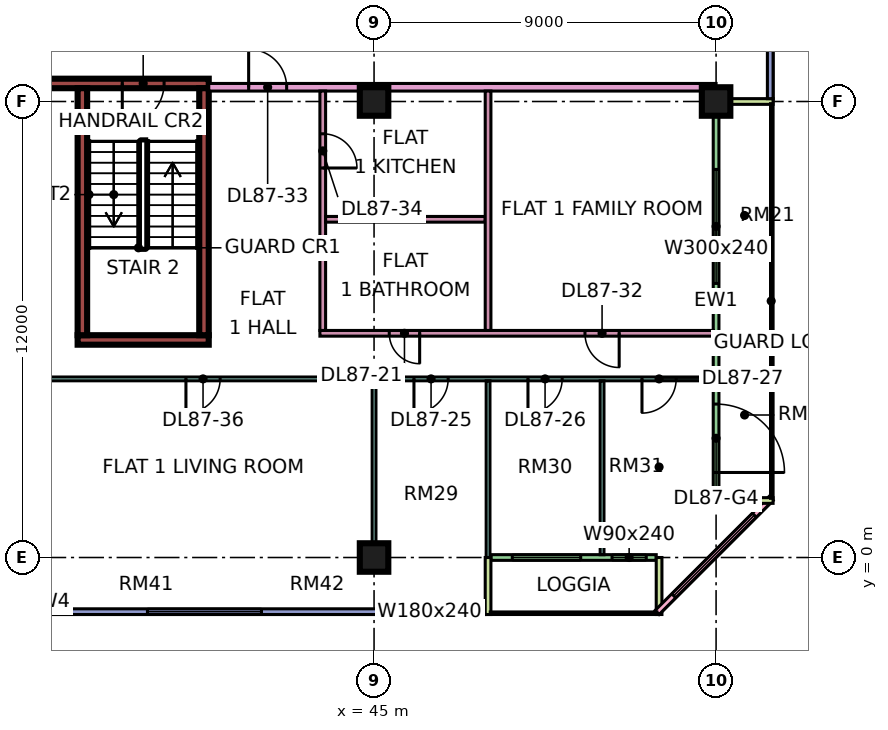
"""IFC4 building model, lengths in metres.
Left out: names, types, materials, properties, quantities, classifications, styles, units other than length and angle.
Written with IfcOpenShell. Run it as: python <this file> out.ifc"""

import sys

from ifc_helpers import new_model, si_unit, direction, frame, frame_2d, origin, origin_2d, place, context, subcontext, project, spatial, rectangle, extrude, element, fill, save


model = new_model("IFC4")
c1 = context("Model", 3, precision=1e-05, world=origin(), true_north=direction((0.0, 1.0)))
c2 = subcontext(c1, "Body", "Model", "MODEL_VIEW")
j1 = project(units=[si_unit("LENGTHUNIT", "METRE"), si_unit("PLANEANGLEUNIT", "RADIAN")], contexts=[c1])
p1 = place(None, origin())
s1 = spatial("IfcSite", under=j1, at=p1, CompositionType="ELEMENT")
p2 = place(p1, origin())
s2 = spatial("IfcBuilding", under=s1, at=p2, CompositionType="ELEMENT")
p3 = place(p2, frame((0.0, 0.0, 372.65)))
s3 = spatial("IfcBuildingStorey", under=s2, at=p3, CompositionType="ELEMENT", Elevation=372.65)
for number, where, z_axis, x_axis in (
    (1, (45.0, 0.0, 0.0), (0.0, 0.0, 1.0), (1.0, 0.0, 0.0)),
    (2, (45.0, 12.0, 0.0), (0.0, 0.0, 1.0), (1.0, 0.0, 0.0)),
    (3, (54.0, 12.0, 0.0), (0.0, 0.0, 1.0), (1.0, 0.0, 0.0)),
):
    element("IfcColumn", number, at=place(p3, frame(where, z_axis=z_axis, x_axis=x_axis)), inside=s3, PredefinedType="COLUMN", context=c2, shape_type="SweptSolid", body=[
        extrude(rectangle(XDim=0.75, YDim=0.75, at=origin_2d()), origin(), (0.0, 0.0, 1.0), 3.75),
    ])
p4 = place(p3, frame((37.2, 5.725, 0.0), z_axis=(0.0, 0.0, 1.0), x_axis=(1.0, 0.0, 0.0)))
e4 = element("IfcWall", 4, at=p4, inside=s3, PredefinedType="SHEAR", context=c2, shape_type="SweptSolid", body=[
    extrude(rectangle(XDim=3.45, YDim=0.25, at=frame_2d((1.725, 0.0))), origin(), (0.0, 0.0, 1.0), 3.75),
])
p5 = place(p3, frame((36.375, 12.475, 0.0), z_axis=(0.0, 0.0, 1.0), x_axis=(1.0, 0.0, 0.0)))
e5 = element("IfcWall", 5, at=p5, inside=s3, PredefinedType="SHEAR", context=c2, shape_type="SweptSolid", body=[
    extrude(rectangle(XDim=4.275, YDim=0.25, at=frame_2d((2.137, 0.0))), origin(), (0.0, 0.0, 1.0), 3.75),
])
p6 = place(p5, frame((2.0, 0.0, 0.0)))
e6 = element("IfcOpeningElement", 6, at=p6, cuts=e5, PredefinedType="OPENING", context=c2, shape_type="SweptSolid", body=[
    extrude(rectangle(XDim=1.1, YDim=2.2, at=frame_2d((0.55, 1.1))), frame((0.0, 0.135, 0.0), z_axis=(0.0, -1.0, 0.0), x_axis=(1.0, 0.0, 0.0)), (0.0, 0.0, 1.0), 0.27),
])
for number, where, z_axis, x_axis in (
    (7, (37.325, 5.85, 0.0), (0.0, 0.0, 1.0), (0.0, 1.0, 0.0)),
    (8, (40.525, 5.85, 0.0), (0.0, 0.0, 1.0), (0.0, 1.0, 0.0)),
):
    element("IfcWall", number, at=place(p3, frame(where, z_axis=z_axis, x_axis=x_axis)), inside=s3, PredefinedType="SHEAR", context=c2, shape_type="SweptSolid", body=[
        extrude(rectangle(XDim=6.5, YDim=0.25, at=frame_2d((3.25, 0.0))), origin(), (0.0, 0.0, 1.0), 3.75),
    ])
p7 = place(p3, frame((36.075, -1.425, 0.0), z_axis=(0.0, 0.0, 1.0), x_axis=(1.0, 0.0, 0.0)))
e9 = element("IfcWall", 9, at=p7, inside=s3, PredefinedType="SOLIDWALL", context=c2, shape_type="SweptSolid", body=[
    extrude(rectangle(XDim=11.85, YDim=0.15, at=frame_2d((5.925, 0.0))), origin(), (0.0, 0.0, 1.0), 3.35),
])
p8 = place(p7, frame((2.962, 0.0, 0.45)))
e10 = element("IfcOpeningElement", 10, at=p8, cuts=e9, PredefinedType="OPENING", context=c2, shape_type="SweptSolid", body=[
    extrude(rectangle(XDim=3.0, YDim=2.4, at=frame_2d((1.5, 1.2))), frame((0.0, 0.085, 0.0), z_axis=(0.0, -1.0, 0.0), x_axis=(1.0, 0.0, 0.0)), (0.0, 0.0, 1.0), 0.17),
])
p9 = place(p7, frame((9.488, 0.0, 0.45)))
e11 = element("IfcOpeningElement", 11, at=p9, cuts=e9, PredefinedType="OPENING", context=c2, shape_type="SweptSolid", body=[
    extrude(rectangle(XDim=1.8, YDim=2.4, at=frame_2d((0.9, 1.2))), frame((0.0, 0.085, 0.0), z_axis=(0.0, -1.0, 0.0), x_axis=(1.0, 0.0, 0.0)), (0.0, 0.0, 1.0), 0.17),
])
p10 = place(p3, frame((48.075, 0.0, 0.0), z_axis=(0.0, 0.0, 1.0), x_axis=(1.0, 0.0, 0.0)))
e12 = element("IfcWall", 12, at=p10, inside=s3, PredefinedType="SOLIDWALL", context=c2, shape_type="SweptSolid", body=[
    extrude(rectangle(XDim=4.35, YDim=0.15, at=frame_2d((2.175, 0.0))), origin(), (0.0, 0.0, 1.0), 3.35),
])
p11 = place(p10, frame((0.562, 0.0, 0.45)))
e13 = element("IfcOpeningElement", 13, at=p11, cuts=e12, PredefinedType="OPENING", context=c2, shape_type="SweptSolid", body=[
    extrude(rectangle(XDim=1.8, YDim=2.4, at=frame_2d((0.9, 1.2))), frame((0.0, 0.085, 0.0), z_axis=(0.0, -1.0, 0.0), x_axis=(1.0, 0.0, 0.0)), (0.0, 0.0, 1.0), 0.17),
])
p12 = place(p10, frame((3.188, 0.0, 0.45)))
e14 = element("IfcOpeningElement", 14, at=p12, cuts=e12, PredefinedType="OPENING", context=c2, shape_type="SweptSolid", body=[
    extrude(rectangle(XDim=0.9, YDim=2.4, at=frame_2d((0.45, 1.2))), frame((0.0, 0.085, 0.0), z_axis=(0.0, -1.0, 0.0), x_axis=(1.0, 0.0, 0.0)), (0.0, 0.0, 1.0), 0.17),
])
for number, where, z_axis, x_axis in (
    (15, (48.0, -1.5, 0.0), (0.0, 0.0, 1.0), (0.0, 1.0, 0.0)),
    (16, (52.5, -1.5, 0.0), (0.0, 0.0, 1.0), (0.0, 1.0, 0.0)),
):
    element("IfcWall", number, at=place(p3, frame(where, z_axis=z_axis, x_axis=x_axis)), inside=s3, PredefinedType="SOLIDWALL", context=c2, shape_type="SweptSolid", body=[
        extrude(rectangle(XDim=1.5, YDim=0.15, at=frame_2d((0.75, 0.0))), origin(), (0.0, 0.0, 1.0), 3.35),
    ])
p13 = place(p3, frame((52.447, -1.447, 0.0), z_axis=(0.0, 0.0, 1.0), x_axis=(0.707106781187, 0.707106781187, 0.0)))
e17 = element("IfcWall", 17, at=p13, inside=s3, PredefinedType="SOLIDWALL", context=c2, shape_type="SweptSolid", body=[
    extrude(rectangle(XDim=4.243, YDim=0.15, at=frame_2d((2.121, 0.0))), origin(), (0.0, 0.0, 1.0), 3.35),
])
p14 = place(p13, frame((0.621, 0.0, 0.45)))
e18 = element("IfcOpeningElement", 18, at=p14, cuts=e17, PredefinedType="OPENING", context=c2, shape_type="SweptSolid", body=[
    extrude(rectangle(XDim=3.0, YDim=2.4, at=frame_2d((1.5, 1.2))), frame((0.0, 0.085, 0.0), z_axis=(0.0, -1.0, 0.0), x_axis=(1.0, 0.0, 0.0)), (0.0, 0.0, 1.0), 0.17),
])
p15 = place(p3, frame((54.0, 1.575, 0.0), z_axis=(0.0, 0.0, 1.0), x_axis=(0.0, 1.0, 0.0)))
e19 = element("IfcWall", 19, at=p15, inside=s3, PredefinedType="SOLIDWALL", context=c2, shape_type="SweptSolid", body=[
    extrude(rectangle(XDim=10.35, YDim=0.15, at=frame_2d((5.175, 0.0))), origin(), (0.0, 0.0, 1.0), 3.35),
])
p16 = place(p15, frame((0.663, 0.0, 0.0)))
e20 = element("IfcOpeningElement", 20, at=p16, cuts=e19, PredefinedType="OPENING", context=c2, shape_type="SweptSolid", body=[
    extrude(rectangle(XDim=1.8, YDim=2.4, at=frame_2d((0.9, 1.2))), frame((0.0, 0.085, 0.0), z_axis=(0.0, -1.0, 0.0), x_axis=(1.0, 0.0, 0.0)), (0.0, 0.0, 1.0), 0.17),
])
p17 = place(p15, frame((5.637, 0.0, 0.45)))
e21 = element("IfcOpeningElement", 21, at=p17, cuts=e19, PredefinedType="OPENING", context=c2, shape_type="SweptSolid", body=[
    extrude(rectangle(XDim=3.0, YDim=2.4, at=frame_2d((1.5, 1.2))), frame((0.0, 0.085, 0.0), z_axis=(0.0, -1.0, 0.0), x_axis=(1.0, 0.0, 0.0)), (0.0, 0.0, 1.0), 0.17),
])
for number, where, z_axis, x_axis in (
    (22, (55.5, 1.5, 0.0), (0.0, 0.0, 1.0), (-1.0, 0.0, 0.0)),
    (23, (55.5, 12.0, 0.0), (0.0, 0.0, 1.0), (-1.0, 0.0, 0.0)),
):
    element("IfcWall", number, at=place(p3, frame(where, z_axis=z_axis, x_axis=x_axis)), inside=s3, PredefinedType="SOLIDWALL", context=c2, shape_type="SweptSolid", body=[
        extrude(rectangle(XDim=1.5, YDim=0.15, at=frame_2d((0.75, 0.0))), origin(), (0.0, 0.0, 1.0), 3.35),
    ])
p18 = place(p3, frame((55.425, 12.075, 0.0), z_axis=(0.0, 0.0, 1.0), x_axis=(0.0, 1.0, 0.0)))
e24 = element("IfcWall", 24, at=p18, inside=s3, PredefinedType="SOLIDWALL", context=c2, shape_type="SweptSolid", body=[
    extrude(rectangle(XDim=10.425, YDim=0.15, at=frame_2d((5.212, 0.0))), origin(), (0.0, 0.0, 1.0), 3.35),
])
p19 = place(p18, frame((4.575, 0.0, 0.45)))
e25 = element("IfcOpeningElement", 25, at=p19, cuts=e24, PredefinedType="OPENING", context=c2, shape_type="SweptSolid", body=[
    extrude(rectangle(XDim=4.8, YDim=2.4, at=frame_2d((2.4, 1.2))), frame((0.0, 0.085, 0.0), z_axis=(0.0, -1.0, 0.0), x_axis=(1.0, 0.0, 0.0)), (0.0, 0.0, 1.0), 0.17),
])
p20 = place(p3, frame((33.05, 4.7, 0.0), z_axis=(0.0, 0.0, 1.0), x_axis=(1.0, 0.0, 0.0)))
e26 = element("IfcWall", 26, at=p20, inside=s3, PredefinedType="PARTITIONING", context=c2, shape_type="SweptSolid", body=[
    extrude(rectangle(XDim=20.876, YDim=0.1, at=frame_2d((10.438, 0.0))), origin(), (0.0, 0.0, 1.0), 3.35),
])
p21 = place(p20, frame((1.0, 0.0, 0.0)))
e27 = element("IfcOpeningElement", 27, at=p21, cuts=e26, PredefinedType="OPENING", context=c2, shape_type="SweptSolid", body=[
    extrude(rectangle(XDim=0.9, YDim=2.1, at=frame_2d((0.45, 1.05))), frame((0.0, 0.06, 0.0), z_axis=(0.0, -1.0, 0.0), x_axis=(1.0, 0.0, 0.0)), (0.0, 0.0, 1.0), 0.12),
])
p22 = place(p20, frame((13.0, 0.0, 0.0)))
e28 = element("IfcOpeningElement", 28, at=p22, cuts=e26, PredefinedType="OPENING", context=c2, shape_type="SweptSolid", body=[
    extrude(rectangle(XDim=0.9, YDim=2.1, at=frame_2d((0.45, 1.05))), frame((0.0, 0.06, 0.0), z_axis=(0.0, -1.0, 0.0), x_axis=(1.0, 0.0, 0.0)), (0.0, 0.0, 1.0), 0.12),
])
p23 = place(p20, frame((16.0, 0.0, 0.0)))
e29 = element("IfcOpeningElement", 29, at=p23, cuts=e26, PredefinedType="OPENING", context=c2, shape_type="SweptSolid", body=[
    extrude(rectangle(XDim=0.9, YDim=2.1, at=frame_2d((0.45, 1.05))), frame((0.0, 0.06, 0.0), z_axis=(0.0, -1.0, 0.0), x_axis=(1.0, 0.0, 0.0)), (0.0, 0.0, 1.0), 0.12),
])
p24 = place(p20, frame((19.0, 0.0, 0.0)))
e30 = element("IfcOpeningElement", 30, at=p24, cuts=e26, PredefinedType="OPENING", context=c2, shape_type="SweptSolid", body=[
    extrude(rectangle(XDim=0.9, YDim=2.1, at=frame_2d((0.45, 1.05))), frame((0.0, 0.06, 0.0), z_axis=(0.0, -1.0, 0.0), x_axis=(1.0, 0.0, 0.0)), (0.0, 0.0, 1.0), 0.12),
])
p25 = place(p20, frame((7.0, 0.0, 0.0)))
e31 = element("IfcOpeningElement", 31, at=p25, cuts=e26, PredefinedType="OPENING", context=c2, shape_type="SweptSolid", body=[
    extrude(rectangle(XDim=0.9, YDim=2.1, at=frame_2d((0.45, 1.05))), frame((0.0, 0.06, 0.0), z_axis=(0.0, -1.0, 0.0), x_axis=(1.0, 0.0, 0.0)), (0.0, 0.0, 1.0), 0.12),
])
p26 = place(p3, frame((40.65, 12.375, 0.0), z_axis=(0.0, 0.0, 1.0), x_axis=(1.0, 0.0, 0.0)))
e32 = element("IfcWall", 32, at=p26, inside=s3, PredefinedType="PARTITIONING", context=c2, shape_type="SweptSolid", body=[
    extrude(rectangle(XDim=13.35, YDim=0.2, at=frame_2d((6.675, 0.0))), origin(), (0.0, 0.0, 1.0), 3.35),
])
p27 = place(p26, frame((1.05, 0.0, 0.0)))
e33 = element("IfcOpeningElement", 33, at=p27, cuts=e32, PredefinedType="OPENING", context=c2, shape_type="SweptSolid", body=[
    extrude(rectangle(XDim=1.0, YDim=2.1, at=frame_2d((0.5, 1.05))), frame((0.0, 0.11, 0.0), z_axis=(0.0, -1.0, 0.0), x_axis=(1.0, 0.0, 0.0)), (0.0, 0.0, 1.0), 0.22),
])
p28 = place(p3, frame((43.575, 5.9, 0.0), z_axis=(0.0, 0.0, 1.0), x_axis=(1.0, 0.0, 0.0)))
e34 = element("IfcWall", 34, at=p28, inside=s3, PredefinedType="PARTITIONING", context=c2, shape_type="SweptSolid", body=[
    extrude(rectangle(XDim=10.351, YDim=0.15, at=frame_2d((5.176, 0.0))), origin(), (0.0, 0.0, 1.0), 3.35),
])
p29 = place(p28, frame((1.825, 0.0, 0.0)))
e35 = element("IfcOpeningElement", 35, at=p29, cuts=e34, PredefinedType="OPENING", context=c2, shape_type="SweptSolid", body=[
    extrude(rectangle(XDim=0.8, YDim=2.1, at=frame_2d((0.4, 1.05))), frame((0.0, 0.085, 0.0), z_axis=(0.0, -1.0, 0.0), x_axis=(1.0, 0.0, 0.0)), (0.0, 0.0, 1.0), 0.17),
])
p30 = place(p28, frame((6.975, 0.0, 0.0)))
e36 = element("IfcOpeningElement", 36, at=p30, cuts=e34, PredefinedType="OPENING", context=c2, shape_type="SweptSolid", body=[
    extrude(rectangle(XDim=0.9, YDim=2.1, at=frame_2d((0.45, 1.05))), frame((0.0, 0.085, 0.0), z_axis=(0.0, -1.0, 0.0), x_axis=(1.0, 0.0, 0.0)), (0.0, 0.0, 1.0), 0.17),
])
p31 = place(p3, frame((43.65, 5.975, 0.0), z_axis=(0.0, 0.0, 1.0), x_axis=(0.0, 1.0, 0.0)))
e37 = element("IfcWall", 37, at=p31, inside=s3, PredefinedType="PARTITIONING", context=c2, shape_type="SweptSolid", body=[
    extrude(rectangle(XDim=6.3, YDim=0.15, at=frame_2d((3.15, 0.0))), origin(), (0.0, 0.0, 1.0), 3.35),
])
p32 = place(p31, frame((4.275, 0.0, 0.0)))
e38 = element("IfcOpeningElement", 38, at=p32, cuts=e37, PredefinedType="OPENING", context=c2, shape_type="SweptSolid", body=[
    extrude(rectangle(XDim=0.9, YDim=2.1, at=frame_2d((0.45, 1.05))), frame((0.0, 0.085, 0.0), z_axis=(0.0, -1.0, 0.0), x_axis=(1.0, 0.0, 0.0)), (0.0, 0.0, 1.0), 0.17),
])
p33 = place(p3, frame((43.725, 8.9, 0.0), z_axis=(0.0, 0.0, 1.0), x_axis=(1.0, 0.0, 0.0)))
e39 = element("IfcWall", 39, at=p33, inside=s3, PredefinedType="PARTITIONING", context=c2, shape_type="SweptSolid", body=[
    extrude(rectangle(XDim=4.2, YDim=0.15, at=frame_2d((2.1, 0.0))), origin(), (0.0, 0.0, 1.0), 3.35),
])
for number, where, z_axis, x_axis in (
    (40, (45.0, 0.0, 0.0), (0.0, 0.0, 1.0), (0.0, 1.0, 0.0)),
    (41, (48.0, 0.0, 0.0), (0.0, 0.0, 1.0), (0.0, 1.0, 0.0)),
):
    element("IfcWall", number, at=place(p3, frame(where, z_axis=z_axis, x_axis=x_axis)), inside=s3, PredefinedType="PARTITIONING", context=c2, shape_type="SweptSolid", body=[
        extrude(rectangle(XDim=4.65, YDim=0.1, at=frame_2d((2.325, 0.0))), origin(), (0.0, 0.0, 1.0), 3.35),
    ])
p34 = place(p3, frame((48.0, 5.975, 0.0), z_axis=(0.0, 0.0, 1.0), x_axis=(0.0, 1.0, 0.0)))
e42 = element("IfcWall", 42, at=p34, inside=s3, PredefinedType="PARTITIONING", context=c2, shape_type="SweptSolid", body=[
    extrude(rectangle(XDim=6.3, YDim=0.15, at=frame_2d((3.15, 0.0))), origin(), (0.0, 0.0, 1.0), 3.35),
])
p35 = place(p3, frame((51.0, 0.074, 0.0), z_axis=(0.0, 0.0, 1.0), x_axis=(0.0, 1.0, 0.0)))
e43 = element("IfcWall", 43, at=p35, inside=s3, PredefinedType="PARTITIONING", context=c2, shape_type="SweptSolid", body=[
    extrude(rectangle(XDim=4.576, YDim=0.1, at=frame_2d((2.288, 0.0))), origin(), (0.0, 0.0, 1.0), 3.35),
])
p36 = place(p8, origin())
e44 = element("IfcWindow", 44, at=p36, inside=s3, PartitioningType="SINGLE_PANEL", PredefinedType="WINDOW", context=c2, shape_type="SweptSolid", body=[
    extrude(rectangle(XDim=3.0, YDim=2.4, at=frame_2d((1.5, 1.2))), frame((0.0, 0.03, 0.0), z_axis=(0.0, -1.0, 0.0), x_axis=(1.0, 0.0, 0.0)), (0.0, 0.0, 1.0), 0.06),
])
fill(e10, e44)
p37 = place(p9, origin())
e45 = element("IfcWindow", 45, at=p37, inside=s3, PartitioningType="SINGLE_PANEL", PredefinedType="WINDOW", context=c2, shape_type="SweptSolid", body=[
    extrude(rectangle(XDim=1.8, YDim=2.4, at=frame_2d((0.9, 1.2))), frame((0.0, 0.03, 0.0), z_axis=(0.0, -1.0, 0.0), x_axis=(1.0, 0.0, 0.0)), (0.0, 0.0, 1.0), 0.06),
])
fill(e11, e45)
p38 = place(p11, origin())
e46 = element("IfcWindow", 46, at=p38, inside=s3, PartitioningType="SINGLE_PANEL", PredefinedType="WINDOW", context=c2, shape_type="SweptSolid", body=[
    extrude(rectangle(XDim=1.8, YDim=2.4, at=frame_2d((0.9, 1.2))), frame((0.0, 0.03, 0.0), z_axis=(0.0, -1.0, 0.0), x_axis=(1.0, 0.0, 0.0)), (0.0, 0.0, 1.0), 0.06),
])
fill(e13, e46)
p39 = place(p12, origin())
e47 = element("IfcWindow", 47, at=p39, inside=s3, PartitioningType="SINGLE_PANEL", PredefinedType="WINDOW", context=c2, shape_type="SweptSolid", body=[
    extrude(rectangle(XDim=0.9, YDim=2.4, at=frame_2d((0.45, 1.2))), frame((0.0, 0.03, 0.0), z_axis=(0.0, -1.0, 0.0), x_axis=(1.0, 0.0, 0.0)), (0.0, 0.0, 1.0), 0.06),
])
fill(e14, e47)
p40 = place(p14, origin())
e48 = element("IfcWindow", 48, at=p40, inside=s3, PartitioningType="SINGLE_PANEL", PredefinedType="WINDOW", context=c2, shape_type="SweptSolid", body=[
    extrude(rectangle(XDim=3.0, YDim=2.4, at=frame_2d((1.5, 1.2))), frame((0.0, 0.03, 0.0), z_axis=(0.0, -1.0, 0.0), x_axis=(1.0, 0.0, 0.0)), (0.0, 0.0, 1.0), 0.06),
])
fill(e18, e48)
p41 = place(p16, frame((1.8, 0.0, 0.0), z_axis=(0.0, 0.0, 1.0), x_axis=(-1.0, 0.0, 0.0)))
e49 = element("IfcDoor", 49, at=p41, inside=s3, OperationType="DOUBLE_DOOR_SINGLE_SWING", PredefinedType="DOOR", context=c2, shape_type="SweptSolid", body=[
    extrude(rectangle(XDim=1.8, YDim=2.4, at=frame_2d((0.9, 1.2))), frame((0.0, 0.025, 0.0), z_axis=(0.0, -1.0, 0.0), x_axis=(1.0, 0.0, 0.0)), (0.0, 0.0, 1.0), 0.05),
])
fill(e20, e49)
p42 = place(p17, origin())
e50 = element("IfcWindow", 50, at=p42, inside=s3, PartitioningType="SINGLE_PANEL", PredefinedType="WINDOW", context=c2, shape_type="SweptSolid", body=[
    extrude(rectangle(XDim=3.0, YDim=2.4, at=frame_2d((1.5, 1.2))), frame((0.0, 0.03, 0.0), z_axis=(0.0, -1.0, 0.0), x_axis=(1.0, 0.0, 0.0)), (0.0, 0.0, 1.0), 0.06),
])
fill(e21, e50)
p43 = place(p6, frame((1.1, 0.0, 0.0), z_axis=(0.0, 0.0, 1.0), x_axis=(-1.0, 0.0, 0.0)))
e51 = element("IfcDoor", 51, at=p43, inside=s3, OperationType="SINGLE_SWING_LEFT", PredefinedType="DOOR", context=c2, shape_type="SweptSolid", body=[
    extrude(rectangle(XDim=1.1, YDim=2.2, at=frame_2d((0.55, 1.1))), frame((0.0, 0.025, 0.0), z_axis=(0.0, -1.0, 0.0), x_axis=(1.0, 0.0, 0.0)), (0.0, 0.0, 1.0), 0.05),
])
fill(e6, e51)
p44 = place(p29, origin())
e52 = element("IfcDoor", 52, at=p44, inside=s3, OperationType="SINGLE_SWING_RIGHT", PredefinedType="DOOR", context=c2, shape_type="SweptSolid", body=[
    extrude(rectangle(XDim=0.8, YDim=2.1, at=frame_2d((0.4, 1.05))), frame((0.0, 0.025, 0.0), z_axis=(0.0, -1.0, 0.0), x_axis=(1.0, 0.0, 0.0)), (0.0, 0.0, 1.0), 0.05),
])
fill(e35, e52)
p45 = place(p22, frame((0.9, 0.0, 0.0), z_axis=(0.0, 0.0, 1.0), x_axis=(-1.0, 0.0, 0.0)))
e53 = element("IfcDoor", 53, at=p45, inside=s3, OperationType="SINGLE_SWING_LEFT", PredefinedType="DOOR", context=c2, shape_type="SweptSolid", body=[
    extrude(rectangle(XDim=0.9, YDim=2.1, at=frame_2d((0.45, 1.05))), frame((0.0, 0.025, 0.0), z_axis=(0.0, -1.0, 0.0), x_axis=(1.0, 0.0, 0.0)), (0.0, 0.0, 1.0), 0.05),
])
fill(e28, e53)
p46 = place(p23, frame((0.9, 0.0, 0.0), z_axis=(0.0, 0.0, 1.0), x_axis=(-1.0, 0.0, 0.0)))
e54 = element("IfcDoor", 54, at=p46, inside=s3, OperationType="SINGLE_SWING_LEFT", PredefinedType="DOOR", context=c2, shape_type="SweptSolid", body=[
    extrude(rectangle(XDim=0.9, YDim=2.1, at=frame_2d((0.45, 1.05))), frame((0.0, 0.025, 0.0), z_axis=(0.0, -1.0, 0.0), x_axis=(1.0, 0.0, 0.0)), (0.0, 0.0, 1.0), 0.05),
])
fill(e29, e54)
p47 = place(p24, frame((0.9, 0.0, 0.0), z_axis=(0.0, 0.0, 1.0), x_axis=(-1.0, 0.0, 0.0)))
e55 = element("IfcDoor", 55, at=p47, inside=s3, OperationType="SINGLE_SWING_LEFT", PredefinedType="DOOR", context=c2, shape_type="SweptSolid", body=[
    extrude(rectangle(XDim=0.9, YDim=2.1, at=frame_2d((0.45, 1.05))), frame((0.0, 0.025, 0.0), z_axis=(0.0, -1.0, 0.0), x_axis=(1.0, 0.0, 0.0)), (0.0, 0.0, 1.0), 0.05),
])
fill(e30, e55)
p48 = place(p30, origin())
e56 = element("IfcDoor", 56, at=p48, inside=s3, OperationType="SINGLE_SWING_RIGHT", PredefinedType="DOOR", context=c2, shape_type="SweptSolid", body=[
    extrude(rectangle(XDim=0.9, YDim=2.1, at=frame_2d((0.45, 1.05))), frame((0.0, 0.025, 0.0), z_axis=(0.0, -1.0, 0.0), x_axis=(1.0, 0.0, 0.0)), (0.0, 0.0, 1.0), 0.05),
])
fill(e36, e56)
p49 = place(p27, origin())
e57 = element("IfcDoor", 57, at=p49, inside=s3, OperationType="SINGLE_SWING_LEFT", PredefinedType="DOOR", context=c2, shape_type="SweptSolid", body=[
    extrude(rectangle(XDim=1.0, YDim=2.1, at=frame_2d((0.5, 1.05))), frame((0.0, 0.025, 0.0), z_axis=(0.0, -1.0, 0.0), x_axis=(1.0, 0.0, 0.0)), (0.0, 0.0, 1.0), 0.05),
])
fill(e33, e57)
p50 = place(p32, frame((0.9, 0.0, 0.0), z_axis=(0.0, 0.0, 1.0), x_axis=(-1.0, 0.0, 0.0)))
e58 = element("IfcDoor", 58, at=p50, inside=s3, OperationType="SINGLE_SWING_LEFT", PredefinedType="DOOR", context=c2, shape_type="SweptSolid", body=[
    extrude(rectangle(XDim=0.9, YDim=2.1, at=frame_2d((0.45, 1.05))), frame((0.0, 0.025, 0.0), z_axis=(0.0, -1.0, 0.0), x_axis=(1.0, 0.0, 0.0)), (0.0, 0.0, 1.0), 0.05),
])
fill(e38, e58)
p51 = place(p25, frame((0.9, 0.0, 0.0), z_axis=(0.0, 0.0, 1.0), x_axis=(-1.0, 0.0, 0.0)))
e59 = element("IfcDoor", 59, at=p51, inside=s3, OperationType="SINGLE_SWING_LEFT", PredefinedType="DOOR", context=c2, shape_type="SweptSolid", body=[
    extrude(rectangle(XDim=0.9, YDim=2.1, at=frame_2d((0.45, 1.05))), frame((0.0, 0.025, 0.0), z_axis=(0.0, -1.0, 0.0), x_axis=(1.0, 0.0, 0.0)), (0.0, 0.0, 1.0), 0.05),
])
fill(e31, e59)
save(model, sys.argv[1])
